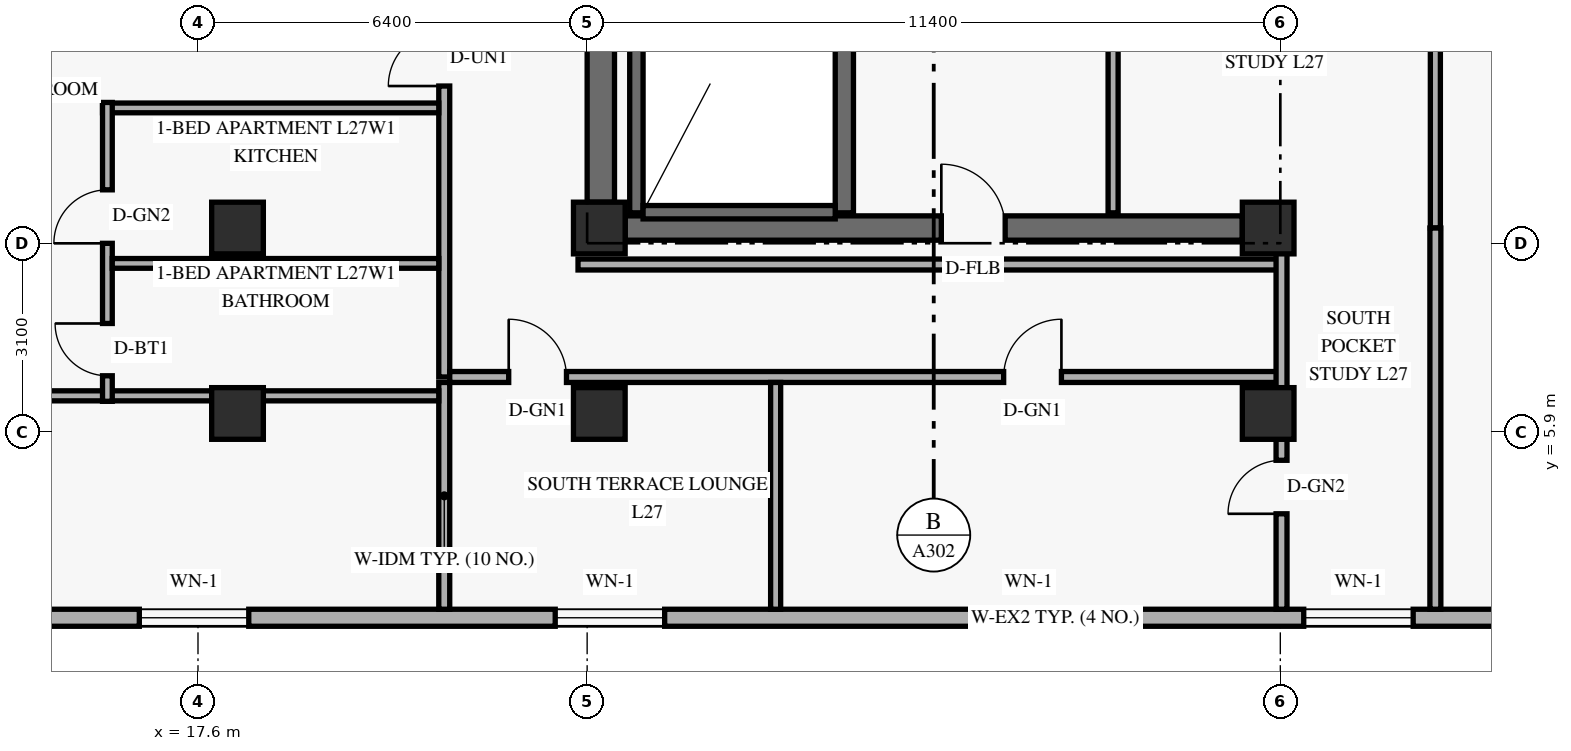
"""IFC4 building model, lengths in metres.
Left out: names, types, materials, properties, quantities, classifications, styles, units other than length and angle.
Written with IfcOpenShell. Run it as: python <this file> out.ifc"""

import sys

from ifc_helpers import new_model, si_unit, direction, frame, frame_2d, origin, origin_2d, place, context, subcontext, project, spatial, rectangle, extrude, element, fill, save


model = new_model("IFC4")
c1 = context("Model", 3, precision=1e-05, world=origin(), true_north=direction((0.0, 1.0)))
c2 = subcontext(c1, "Body", "Model", "MODEL_VIEW")
j1 = project(units=[si_unit("LENGTHUNIT", "METRE"), si_unit("PLANEANGLEUNIT", "RADIAN")], contexts=[c1])
p1 = place(None, origin())
s1 = spatial("IfcSite", under=j1, at=p1, CompositionType="ELEMENT")
p2 = place(p1, origin())
s2 = spatial("IfcBuilding", under=s1, at=p2, CompositionType="ELEMENT")
p3 = place(p2, frame((0.0, 0.0, 106.2)))
s3 = spatial("IfcBuildingStorey", under=s2, at=p3, CompositionType="ELEMENT", Elevation=106.2)
p4 = place(p3, frame((24.225, 9.675, 0.0), z_axis=(0.0, 0.0, 1.0), x_axis=(0.0, 1.0, 0.0)))
e1 = element("IfcWall", 1, at=p4, inside=s3, PredefinedType="SHEAR", context=c2, shape_type="SweptSolid", body=[
    extrude(rectangle(XDim=7.45, YDim=0.45, at=frame_2d((3.725, 0.0))), origin(), (0.0, 0.0, 1.0), 2.749),
])
p5 = place(p3, frame((24.625, 9.25, 0.0), z_axis=(0.0, 0.0, 1.0), x_axis=(1.0, 0.0, 0.0)))
e2 = element("IfcWall", 2, at=p5, inside=s3, PredefinedType="SHEAR", context=c2, shape_type="SweptSolid", body=[
    extrude(rectangle(XDim=10.15, YDim=0.4, at=frame_2d((5.075, 0.0))), origin(), (0.0, 0.0, 1.0), 3.36),
])
p6 = place(p5, frame((5.2, 0.0, 0.0)))
e3 = element("IfcOpeningElement", 3, at=p6, cuts=e2, PredefinedType="OPENING", context=c2, shape_type="SweptSolid", body=[
    extrude(rectangle(XDim=1.05, YDim=2.15, at=frame_2d((0.525, 1.075))), frame((0.0, 0.21, 0.0), z_axis=(0.0, -1.0, 0.0), x_axis=(1.0, 0.0, 0.0)), (0.0, 0.0, 1.0), 0.42),
])
p7 = place(p3, frame((24.81, 9.5, 0.0), z_axis=(0.0, 0.0, 1.0), x_axis=(0.0, 1.0, 0.0)))
e4 = element("IfcWall", 4, at=p7, inside=s3, PredefinedType="SHEAR", context=c2, shape_type="SweptSolid", body=[
    extrude(rectangle(XDim=7.76, YDim=0.22, at=frame_2d((3.88, 0.0))), origin(), (0.0, 0.0, 1.0), 3.36),
])
p8 = place(p3, frame((28.23, 9.5, 0.0), z_axis=(0.0, 0.0, 1.0), x_axis=(0.0, 1.0, 0.0)))
e5 = element("IfcWall", 5, at=p8, inside=s3, PredefinedType="SHEAR", context=c2, shape_type="SweptSolid", body=[
    extrude(rectangle(XDim=7.76, YDim=0.3, at=frame_2d((3.88, 0.0))), origin(), (0.0, 0.0, 1.0), 3.36),
])
p9 = place(p3, frame((24.92, 9.51, 0.0), z_axis=(0.0, 0.0, 1.0), x_axis=(1.0, 0.0, 0.0)))
e6 = element("IfcWall", 6, at=p9, inside=s3, PredefinedType="SHEAR", context=c2, shape_type="SweptSolid", body=[
    extrude(rectangle(XDim=3.16, YDim=0.22, at=frame_2d((1.58, 0.0))), origin(), (0.0, 0.0, 1.0), 3.36),
])
for number, where, z_axis, x_axis in (
    (7, (18.25, 6.2, 0.0), (0.0, 0.0, 1.0), (1.0, 0.0, 0.0)),
    (8, (18.25, 9.25, 0.0), (0.0, 0.0, 1.0), (1.0, 0.0, 0.0)),
    (9, (24.2, 6.2, 0.0), (0.0, 0.0, 1.0), (1.0, 0.0, 0.0)),
    (10, (24.2, 9.25, 0.0), (0.0, 0.0, 1.0), (1.0, 0.0, 0.0)),
    (11, (35.2, 6.2, 0.0), (0.0, 0.0, 1.0), (1.0, 0.0, 0.0)),
    (12, (35.2, 9.25, 0.0), (0.0, 0.0, 1.0), (1.0, 0.0, 0.0)),
):
    element("IfcColumn", number, at=place(p3, frame(where, z_axis=z_axis, x_axis=x_axis)), inside=s3, PredefinedType="COLUMN", context=c2, shape_type="SweptSolid", body=[
        extrude(rectangle(XDim=0.85, YDim=0.85, at=origin_2d()), origin(), (0.0, 0.0, 1.0), 3.6),
    ])
p10 = place(p3, frame((13.42, 2.84, 0.0), z_axis=(0.0, 0.0, 1.0), x_axis=(1.0, 0.0, 0.0)))
e13 = element("IfcWall", 13, at=p10, inside=s3, PredefinedType="SOLIDWALL", context=c2, shape_type="SweptSolid", body=[
    extrude(rectangle(XDim=36.56, YDim=0.28, at=frame_2d((18.28, 0.0))), origin(), (0.0, 0.0, 1.0), 3.36),
])
p11 = place(p10, frame((3.215, 0.0, 0.85)))
e14 = element("IfcOpeningElement", 14, at=p11, cuts=e13, PredefinedType="OPENING", context=c2, shape_type="SweptSolid", body=[
    extrude(rectangle(XDim=1.8, YDim=1.6, at=frame_2d((0.9, 0.8))), frame((0.0, 0.15, 0.0), z_axis=(0.0, -1.0, 0.0), x_axis=(1.0, 0.0, 0.0)), (0.0, 0.0, 1.0), 0.3),
])
p12 = place(p10, frame((10.055, 0.0, 0.85)))
e15 = element("IfcOpeningElement", 15, at=p12, cuts=e13, PredefinedType="OPENING", context=c2, shape_type="SweptSolid", body=[
    extrude(rectangle(XDim=1.8, YDim=1.6, at=frame_2d((0.9, 0.8))), frame((0.0, 0.15, 0.0), z_axis=(0.0, -1.0, 0.0), x_axis=(1.0, 0.0, 0.0)), (0.0, 0.0, 1.0), 0.3),
])
p13 = place(p10, frame((16.94, 0.0, 0.85)))
e16 = element("IfcOpeningElement", 16, at=p13, cuts=e13, PredefinedType="OPENING", context=c2, shape_type="SweptSolid", body=[
    extrude(rectangle(XDim=1.8, YDim=1.6, at=frame_2d((0.9, 0.8))), frame((0.0, 0.15, 0.0), z_axis=(0.0, -1.0, 0.0), x_axis=(1.0, 0.0, 0.0)), (0.0, 0.0, 1.0), 0.3),
])
p14 = place(p10, frame((22.365, 0.0, 0.85)))
e17 = element("IfcOpeningElement", 17, at=p14, cuts=e13, PredefinedType="OPENING", context=c2, shape_type="SweptSolid", body=[
    extrude(rectangle(XDim=1.8, YDim=1.6, at=frame_2d((0.9, 0.8))), frame((0.0, 0.15, 0.0), z_axis=(0.0, -1.0, 0.0), x_axis=(1.0, 0.0, 0.0)), (0.0, 0.0, 1.0), 0.3),
])
p15 = place(p10, frame((27.455, 0.0, 0.85)))
e18 = element("IfcOpeningElement", 18, at=p15, cuts=e13, PredefinedType="OPENING", context=c2, shape_type="SweptSolid", body=[
    extrude(rectangle(XDim=1.8, YDim=1.6, at=frame_2d((0.9, 0.8))), frame((0.0, 0.15, 0.0), z_axis=(0.0, -1.0, 0.0), x_axis=(1.0, 0.0, 0.0)), (0.0, 0.0, 1.0), 0.3),
])
p16 = place(p10, frame((32.48, 0.0, 0.85)))
e19 = element("IfcOpeningElement", 19, at=p16, cuts=e13, PredefinedType="OPENING", context=c2, shape_type="SweptSolid", body=[
    extrude(rectangle(XDim=1.2, YDim=1.5, at=frame_2d((0.6, 0.75))), frame((0.0, 0.15, 0.0), z_axis=(0.0, -1.0, 0.0), x_axis=(1.0, 0.0, 0.0)), (0.0, 0.0, 1.0), 0.3),
])
p17 = place(p10, frame((34.37, 0.0, 0.85)))
e20 = element("IfcOpeningElement", 20, at=p17, cuts=e13, PredefinedType="OPENING", context=c2, shape_type="SweptSolid", body=[
    extrude(rectangle(XDim=1.8, YDim=1.6, at=frame_2d((0.9, 0.8))), frame((0.0, 0.15, 0.0), z_axis=(0.0, -1.0, 0.0), x_axis=(1.0, 0.0, 0.0)), (0.0, 0.0, 1.0), 0.3),
])
p18 = place(p3, frame((32.65, 9.5, 0.0), z_axis=(0.0, 0.0, 1.0), x_axis=(0.0, 1.0, 0.0)))
e21 = element("IfcWall", 21, at=p18, inside=s3, PredefinedType="PARTITIONING", context=c2, shape_type="SweptSolid", body=[
    extrude(rectangle(XDim=6.08, YDim=0.165, at=frame_2d((3.04, 0.0))), origin(), (0.0, 0.0, 1.0), 3.36),
])
p19 = place(p3, frame((37.95, 9.25, 0.0), z_axis=(0.0, 0.0, 1.0), x_axis=(0.0, 1.0, 0.0)))
e22 = element("IfcWall", 22, at=p19, inside=s3, PredefinedType="PARTITIONING", context=c2, shape_type="SweptSolid", body=[
    extrude(rectangle(XDim=6.248, YDim=0.165, at=frame_2d((3.124, 0.0))), origin(), (0.0, 0.0, 1.0), 2.731),
])
p20 = place(p3, frame((21.65, 6.8, 0.0), z_axis=(0.0, 0.0, 1.0), x_axis=(0.0, 1.0, 0.0)))
e23 = element("IfcWall", 23, at=p20, inside=s3, PredefinedType="STANDARD", context=c2, shape_type="SweptSolid", body=[
    extrude(rectangle(XDim=34.4, YDim=0.18, at=frame_2d((17.2, 0.0))), origin(), (0.0, 0.0, 1.0), 2.731),
])
p21 = place(p20, frame((4.785, 0.0, 0.0)))
e24 = element("IfcOpeningElement", 24, at=p21, cuts=e23, PredefinedType="OPENING", context=c2, shape_type="SweptSolid", body=[
    extrude(rectangle(XDim=0.92, YDim=2.15, at=frame_2d((0.46, 1.075))), frame((0.0, 0.1, 0.0), z_axis=(0.0, -1.0, 0.0), x_axis=(1.0, 0.0, 0.0)), (0.0, 0.0, 1.0), 0.2),
])
p22 = place(p20, frame((15.384, 0.0, 0.0)))
e25 = element("IfcOpeningElement", 25, at=p22, cuts=e23, PredefinedType="OPENING", context=c2, shape_type="SweptSolid", body=[
    extrude(rectangle(XDim=0.92, YDim=2.15, at=frame_2d((0.46, 1.075))), frame((0.0, 0.1, 0.0), z_axis=(0.0, -1.0, 0.0), x_axis=(1.0, 0.0, 0.0)), (0.0, 0.0, 1.0), 0.2),
])
p23 = place(p20, frame((28.41, 0.0, 0.0)))
e26 = element("IfcOpeningElement", 26, at=p23, cuts=e23, PredefinedType="OPENING", context=c2, shape_type="SweptSolid", body=[
    extrude(rectangle(XDim=0.92, YDim=2.15, at=frame_2d((0.46, 1.075))), frame((0.0, 0.1, 0.0), z_axis=(0.0, -1.0, 0.0), x_axis=(1.0, 0.0, 0.0)), (0.0, 0.0, 1.0), 0.2),
])
p24 = place(p3, frame((21.74, 6.8, 0.0), z_axis=(0.0, 0.0, 1.0), x_axis=(1.0, 0.0, 0.0)))
e27 = element("IfcWall", 27, at=p24, inside=s3, PredefinedType="STANDARD", context=c2, shape_type="SweptSolid", body=[
    extrude(rectangle(XDim=13.68, YDim=0.18, at=frame_2d((6.84, 0.0))), origin(), (0.0, 0.0, 1.0), 2.731),
])
p25 = place(p24, frame((0.97, 0.0, 0.0)))
e28 = element("IfcOpeningElement", 28, at=p25, cuts=e27, PredefinedType="OPENING", context=c2, shape_type="SweptSolid", body=[
    extrude(rectangle(XDim=0.95, YDim=2.15, at=frame_2d((0.475, 1.075))), frame((0.0, 0.1, 0.0), z_axis=(0.0, -1.0, 0.0), x_axis=(1.0, 0.0, 0.0)), (0.0, 0.0, 1.0), 0.2),
])
p26 = place(p24, frame((9.11, 0.0, 0.0)))
e29 = element("IfcOpeningElement", 29, at=p26, cuts=e27, PredefinedType="OPENING", context=c2, shape_type="SweptSolid", body=[
    extrude(rectangle(XDim=0.95, YDim=2.15, at=frame_2d((0.475, 1.075))), frame((0.0, 0.1, 0.0), z_axis=(0.0, -1.0, 0.0), x_axis=(1.0, 0.0, 0.0)), (0.0, 0.0, 1.0), 0.2),
])
p27 = place(p3, frame((23.85, 8.65, 0.0), z_axis=(0.0, 0.0, 1.0), x_axis=(1.0, 0.0, 0.0)))
e30 = element("IfcWall", 30, at=p27, inside=s3, PredefinedType="STANDARD", context=c2, shape_type="SweptSolid", body=[
    extrude(rectangle(XDim=11.57, YDim=0.18, at=frame_2d((5.785, 0.0))), origin(), (0.0, 0.0, 1.0), 2.731),
])
p28 = place(p3, frame((21.65, 2.98, 0.0), z_axis=(0.0, 0.0, 1.0), x_axis=(0.0, 1.0, 0.0)))
e31 = element("IfcWall", 31, at=p28, inside=s3, PredefinedType="PARTITIONING", context=c2, shape_type="SweptSolid", body=[
    extrude(rectangle(XDim=3.73, YDim=0.18, at=frame_2d((1.865, 0.0))), origin(), (0.0, 0.0, 1.0), 2.809),
])
p29 = place(p3, frame((35.42, 2.98, 0.0), z_axis=(0.0, 0.0, 1.0), x_axis=(0.0, 1.0, 0.0)))
e32 = element("IfcWall", 32, at=p29, inside=s3, PredefinedType="PARTITIONING", context=c2, shape_type="SweptSolid", body=[
    extrude(rectangle(XDim=6.27, YDim=0.18, at=frame_2d((3.135, 0.0))), origin(), (0.0, 0.0, 1.0), 2.731),
])
p30 = place(p29, frame((1.57, 0.0, 0.0)))
e33 = element("IfcOpeningElement", 33, at=p30, cuts=e32, PredefinedType="OPENING", context=c2, shape_type="SweptSolid", body=[
    extrude(rectangle(XDim=0.88, YDim=2.12, at=frame_2d((0.44, 1.06))), frame((0.0, 0.1, 0.0), z_axis=(0.0, -1.0, 0.0), x_axis=(1.0, 0.0, 0.0)), (0.0, 0.0, 1.0), 0.2),
])
p31 = place(p3, frame((37.95, 2.98, 0.0), z_axis=(0.0, 0.0, 1.0), x_axis=(0.0, 1.0, 0.0)))
e34 = element("IfcWall", 34, at=p31, inside=s3, PredefinedType="PARTITIONING", context=c2, shape_type="SweptSolid", body=[
    extrude(rectangle(XDim=6.27, YDim=0.18, at=frame_2d((3.135, 0.0))), origin(), (0.0, 0.0, 1.0), 2.731),
])
p32 = place(p3, frame((10.08, 6.49, 0.0), z_axis=(0.0, 0.0, 1.0), x_axis=(1.0, 0.0, 0.0)))
e35 = element("IfcWall", 35, at=p32, inside=s3, PredefinedType="PARTITIONING", context=c2, shape_type="SweptSolid", body=[
    extrude(rectangle(XDim=11.48, YDim=0.165, at=frame_2d((5.74, 0.0))), origin(), (0.0, 0.0, 1.0), 3.36),
])
p33 = place(p32, frame((2.41, 0.0, 0.0)))
e36 = element("IfcOpeningElement", 36, at=p33, cuts=e35, PredefinedType="OPENING", context=c2, shape_type="SweptSolid", body=[
    extrude(rectangle(XDim=0.9, YDim=2.14, at=frame_2d((0.45, 1.07))), frame((0.0, 0.093, 0.0), z_axis=(0.0, -1.0, 0.0), x_axis=(1.0, 0.0, 0.0)), (0.0, 0.0, 1.0), 0.185),
])
p34 = place(p3, frame((16.03, 11.226, 0.0), z_axis=(0.0, 0.0, 1.0), x_axis=(1.0, 0.0, 0.0)))
e37 = element("IfcWall", 37, at=p34, inside=s3, PredefinedType="PLUMBINGWALL", context=c2, shape_type="SweptSolid", body=[
    extrude(rectangle(XDim=5.53, YDim=0.16, at=frame_2d((2.765, 0.0))), origin(), (0.0, 0.0, 1.0), 2.731),
])
p35 = place(p3, frame((16.11, 6.4, 0.0), z_axis=(0.0, 0.0, 1.0), x_axis=(0.0, 1.0, 0.0)))
e38 = element("IfcWall", 38, at=p35, inside=s3, PredefinedType="PLUMBINGWALL", context=c2, shape_type="SweptSolid", body=[
    extrude(rectangle(XDim=4.916, YDim=0.16, at=frame_2d((2.458, 0.0))), origin(), (0.0, 0.0, 1.0), 2.731),
])
p36 = place(p35, frame((0.42, 0.0, 0.0)))
e39 = element("IfcOpeningElement", 39, at=p36, cuts=e38, PredefinedType="OPENING", context=c2, shape_type="SweptSolid", body=[
    extrude(rectangle(XDim=0.86, YDim=2.12, at=frame_2d((0.43, 1.06))), frame((0.0, 0.09, 0.0), z_axis=(0.0, -1.0, 0.0), x_axis=(1.0, 0.0, 0.0)), (0.0, 0.0, 1.0), 0.18),
])
p37 = place(p35, frame((2.598, 0.0, 0.0)))
e40 = element("IfcOpeningElement", 40, at=p37, cuts=e38, PredefinedType="OPENING", context=c2, shape_type="SweptSolid", body=[
    extrude(rectangle(XDim=0.88, YDim=2.12, at=frame_2d((0.44, 1.06))), frame((0.0, 0.09, 0.0), z_axis=(0.0, -1.0, 0.0), x_axis=(1.0, 0.0, 0.0)), (0.0, 0.0, 1.0), 0.18),
])
p38 = place(p3, frame((16.19, 8.668, 0.0), z_axis=(0.0, 0.0, 1.0), x_axis=(1.0, 0.0, 0.0)))
e41 = element("IfcWall", 41, at=p38, inside=s3, PredefinedType="PLUMBINGWALL", context=c2, shape_type="SweptSolid", body=[
    extrude(rectangle(XDim=5.37, YDim=0.16, at=frame_2d((2.685, 0.0))), origin(), (0.0, 0.0, 1.0), 2.731),
])
p39 = place(p3, frame((27.1, 2.98, 0.0), z_axis=(0.0, 0.0, 1.0), x_axis=(0.0, 1.0, 0.0)))
e42 = element("IfcWall", 42, at=p39, inside=s3, PredefinedType="PARTITIONING", context=c2, shape_type="SweptSolid", body=[
    extrude(rectangle(XDim=3.73, YDim=0.165, at=frame_2d((1.865, 0.0))), origin(), (0.0, 0.0, 1.0), 2.809),
])
p40 = place(p11, origin())
e43 = element("IfcWindow", 43, at=p40, inside=s3, PartitioningType="SINGLE_PANEL", PredefinedType="WINDOW", context=c2, shape_type="SweptSolid", body=[
    extrude(rectangle(XDim=1.8, YDim=1.6, at=frame_2d((0.9, 0.8))), frame((0.0, 0.03, 0.0), z_axis=(0.0, -1.0, 0.0), x_axis=(1.0, 0.0, 0.0)), (0.0, 0.0, 1.0), 0.06),
])
fill(e14, e43)
p41 = place(p12, origin())
e44 = element("IfcWindow", 44, at=p41, inside=s3, PartitioningType="SINGLE_PANEL", PredefinedType="WINDOW", context=c2, shape_type="SweptSolid", body=[
    extrude(rectangle(XDim=1.8, YDim=1.6, at=frame_2d((0.9, 0.8))), frame((0.0, 0.03, 0.0), z_axis=(0.0, -1.0, 0.0), x_axis=(1.0, 0.0, 0.0)), (0.0, 0.0, 1.0), 0.06),
])
fill(e15, e44)
p42 = place(p13, origin())
e45 = element("IfcWindow", 45, at=p42, inside=s3, PartitioningType="SINGLE_PANEL", PredefinedType="WINDOW", context=c2, shape_type="SweptSolid", body=[
    extrude(rectangle(XDim=1.8, YDim=1.6, at=frame_2d((0.9, 0.8))), frame((0.0, 0.03, 0.0), z_axis=(0.0, -1.0, 0.0), x_axis=(1.0, 0.0, 0.0)), (0.0, 0.0, 1.0), 0.06),
])
fill(e16, e45)
p43 = place(p14, origin())
e46 = element("IfcWindow", 46, at=p43, inside=s3, PartitioningType="SINGLE_PANEL", PredefinedType="WINDOW", context=c2, shape_type="SweptSolid", body=[
    extrude(rectangle(XDim=1.8, YDim=1.6, at=frame_2d((0.9, 0.8))), frame((0.0, 0.03, 0.0), z_axis=(0.0, -1.0, 0.0), x_axis=(1.0, 0.0, 0.0)), (0.0, 0.0, 1.0), 0.06),
])
fill(e17, e46)
p44 = place(p6, origin())
e47 = element("IfcDoor", 47, at=p44, inside=s3, OperationType="SINGLE_SWING_LEFT", PredefinedType="DOOR", context=c2, shape_type="SweptSolid", body=[
    extrude(rectangle(XDim=1.05, YDim=2.15, at=frame_2d((0.525, 1.075))), frame((0.0, 0.025, 0.0), z_axis=(0.0, -1.0, 0.0), x_axis=(1.0, 0.0, 0.0)), (0.0, 0.0, 1.0), 0.05),
])
fill(e3, e47)
p45 = place(p30, origin())
e48 = element("IfcDoor", 48, at=p45, inside=s3, OperationType="SINGLE_SWING_LEFT", PredefinedType="DOOR", context=c2, shape_type="SweptSolid", body=[
    extrude(rectangle(XDim=0.88, YDim=2.12, at=frame_2d((0.44, 1.06))), frame((0.0, 0.025, 0.0), z_axis=(0.0, -1.0, 0.0), x_axis=(1.0, 0.0, 0.0)), (0.0, 0.0, 1.0), 0.05),
])
fill(e33, e48)
p46 = place(p21, origin())
e49 = element("IfcDoor", 49, at=p46, inside=s3, OperationType="SINGLE_SWING_LEFT", PredefinedType="DOOR", context=c2, shape_type="SweptSolid", body=[
    extrude(rectangle(XDim=0.92, YDim=2.15, at=frame_2d((0.46, 1.075))), frame((0.0, 0.025, 0.0), z_axis=(0.0, -1.0, 0.0), x_axis=(1.0, 0.0, 0.0)), (0.0, 0.0, 1.0), 0.05),
])
fill(e24, e49)
p47 = place(p36, origin())
e50 = element("IfcDoor", 50, at=p47, inside=s3, OperationType="SINGLE_SWING_RIGHT", PredefinedType="DOOR", context=c2, shape_type="SweptSolid", body=[
    extrude(rectangle(XDim=0.86, YDim=2.12, at=frame_2d((0.43, 1.06))), frame((0.0, 0.025, 0.0), z_axis=(0.0, -1.0, 0.0), x_axis=(1.0, 0.0, 0.0)), (0.0, 0.0, 1.0), 0.05),
])
fill(e39, e50)
p48 = place(p37, origin())
e51 = element("IfcDoor", 51, at=p48, inside=s3, OperationType="SINGLE_SWING_LEFT", PredefinedType="DOOR", context=c2, shape_type="SweptSolid", body=[
    extrude(rectangle(XDim=0.88, YDim=2.12, at=frame_2d((0.44, 1.06))), frame((0.0, 0.025, 0.0), z_axis=(0.0, -1.0, 0.0), x_axis=(1.0, 0.0, 0.0)), (0.0, 0.0, 1.0), 0.05),
])
fill(e40, e51)
p49 = place(p25, origin())
e52 = element("IfcDoor", 52, at=p49, inside=s3, OperationType="SINGLE_SWING_LEFT", PredefinedType="DOOR", context=c2, shape_type="SweptSolid", body=[
    extrude(rectangle(XDim=0.95, YDim=2.15, at=frame_2d((0.475, 1.075))), frame((0.0, 0.025, 0.0), z_axis=(0.0, -1.0, 0.0), x_axis=(1.0, 0.0, 0.0)), (0.0, 0.0, 1.0), 0.05),
])
fill(e28, e52)
p50 = place(p26, origin())
e53 = element("IfcDoor", 53, at=p50, inside=s3, OperationType="SINGLE_SWING_RIGHT", PredefinedType="DOOR", context=c2, shape_type="SweptSolid", body=[
    extrude(rectangle(XDim=0.95, YDim=2.15, at=frame_2d((0.475, 1.075))), frame((0.0, 0.025, 0.0), z_axis=(0.0, -1.0, 0.0), x_axis=(1.0, 0.0, 0.0)), (0.0, 0.0, 1.0), 0.05),
])
fill(e29, e53)
save(model, sys.argv[1])
